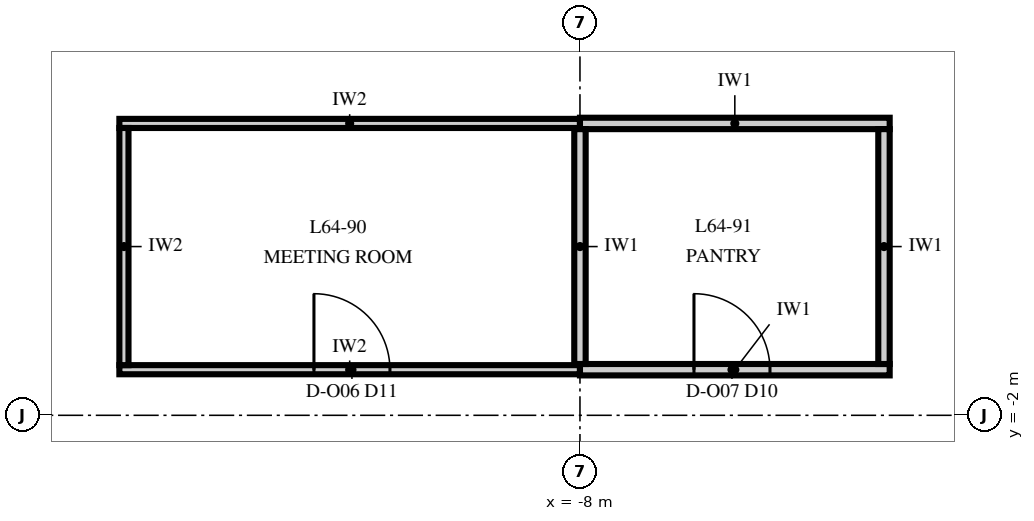
"""IFC4 building model, lengths in metres.
Left out: names, types, materials, properties, quantities, classifications, styles, units other than length and angle.
Written with IfcOpenShell. Run it as: python <this file> out.ifc"""

import sys

from ifc_helpers import new_model, si_unit, direction, frame, frame_2d, origin, place, context, subcontext, project, spatial, rectangle, extrude, element, fill, save


model = new_model("IFC4")
c1 = context("Model", 3, precision=1e-05, world=origin(), true_north=direction((0.0, 1.0)))
c2 = subcontext(c1, "Body", "Model", "MODEL_VIEW")
j1 = project(units=[si_unit("LENGTHUNIT", "METRE"), si_unit("PLANEANGLEUNIT", "RADIAN")], contexts=[c1])
p1 = place(None, origin())
s1 = spatial("IfcSite", under=j1, at=p1, CompositionType="ELEMENT")
p2 = place(p1, origin())
s2 = spatial("IfcBuilding", under=s1, at=p2, CompositionType="ELEMENT")
p3 = place(p2, frame((0.0, 0.0, 276.0)))
s3 = spatial("IfcBuildingStorey", under=s2, at=p3, CompositionType="ELEMENT", Elevation=276.0)
p4 = place(p3, frame((-14.06, -1.4, 0.0), z_axis=(0.0, 0.0, 1.0), x_axis=(1.0, 0.0, 0.0)))
e1 = element("IfcWall", 1, at=p4, inside=s3, PredefinedType="PARTITIONING", context=c2, shape_type="SweptSolid", body=[
    extrude(rectangle(XDim=6.06, YDim=0.12, at=frame_2d((3.03, 0.0))), origin(), (0.0, 0.0, 1.0), 3.23),
])
p5 = place(p4, frame((2.56, 0.0, 0.0)))
e2 = element("IfcOpeningElement", 2, at=p5, cuts=e1, PredefinedType="OPENING", context=c2, shape_type="SweptSolid", body=[
    extrude(rectangle(XDim=1.0, YDim=2.4, at=frame_2d((0.5, 1.2))), frame((0.0, 0.075, 0.0), z_axis=(0.0, -1.0, 0.0), x_axis=(1.0, 0.0, 0.0)), (0.0, 0.0, 1.0), 0.15),
])
p6 = place(p3, frame((-8.0, -1.4, 0.0), z_axis=(0.0, 0.0, 1.0), x_axis=(1.0, 0.0, 0.0)))
e3 = element("IfcWall", 3, at=p6, inside=s3, PredefinedType="PARTITIONING", context=c2, shape_type="SweptSolid", body=[
    extrude(rectangle(XDim=4.075, YDim=0.15, at=frame_2d((2.038, 0.0))), origin(), (0.0, 0.0, 1.0), 3.23),
])
p7 = place(p6, frame((1.5, 0.0, 0.0)))
e4 = element("IfcOpeningElement", 4, at=p7, cuts=e3, PredefinedType="OPENING", context=c2, shape_type="SweptSolid", body=[
    extrude(rectangle(XDim=1.0, YDim=2.3, at=frame_2d((0.5, 1.15))), frame((0.0, 0.09, 0.0), z_axis=(0.0, -1.0, 0.0), x_axis=(1.0, 0.0, 0.0)), (0.0, 0.0, 1.0), 0.18),
])
p8 = place(p3, frame((-14.06, 1.84, 0.0), z_axis=(0.0, 0.0, 1.0), x_axis=(1.0, 0.0, 0.0)))
e5 = element("IfcWall", 5, at=p8, inside=s3, PredefinedType="PARTITIONING", context=c2, shape_type="SweptSolid", body=[
    extrude(rectangle(XDim=6.06, YDim=0.12, at=frame_2d((3.03, 0.0))), origin(), (0.0, 0.0, 1.0), 3.23),
])
p9 = place(p3, frame((-8.0, 1.84, 0.0), z_axis=(0.0, 0.0, 1.0), x_axis=(1.0, 0.0, 0.0)))
e6 = element("IfcWall", 6, at=p9, inside=s3, PredefinedType="PARTITIONING", context=c2, shape_type="SweptSolid", body=[
    extrude(rectangle(XDim=4.075, YDim=0.15, at=frame_2d((2.038, 0.0))), origin(), (0.0, 0.0, 1.0), 3.23),
])
p10 = place(p3, frame((-14.0, -1.34, 0.0), z_axis=(0.0, 0.0, 1.0), x_axis=(0.0, 1.0, 0.0)))
e7 = element("IfcWall", 7, at=p10, inside=s3, PredefinedType="PARTITIONING", context=c2, shape_type="SweptSolid", body=[
    extrude(rectangle(XDim=3.12, YDim=0.12, at=frame_2d((1.56, 0.0))), origin(), (0.0, 0.0, 1.0), 3.23),
])
for number, where, z_axis, x_axis in (
    (8, (-8.0, -1.325, 0.0), (0.0, 0.0, 1.0), (0.0, 1.0, 0.0)),
    (9, (-4.0, -1.325, 0.0), (0.0, 0.0, 1.0), (0.0, 1.0, 0.0)),
):
    element("IfcWall", number, at=place(p3, frame(where, z_axis=z_axis, x_axis=x_axis)), inside=s3, PredefinedType="PARTITIONING", context=c2, shape_type="SweptSolid", body=[
        extrude(rectangle(XDim=3.09, YDim=0.15, at=frame_2d((1.545, 0.0))), origin(), (0.0, 0.0, 1.0), 3.85),
    ])
p11 = place(p5, origin())
e10 = element("IfcDoor", 10, at=p11, inside=s3, OperationType="SINGLE_SWING_RIGHT", PredefinedType="DOOR", context=c2, shape_type="SweptSolid", body=[
    extrude(rectangle(XDim=1.0, YDim=2.4, at=frame_2d((0.5, 1.2))), frame((0.0, 0.06, 0.0), z_axis=(0.0, -1.0, 0.0), x_axis=(1.0, 0.0, 0.0)), (0.0, 0.0, 1.0), 0.12),
])
fill(e2, e10)
p12 = place(p7, origin())
e11 = element("IfcDoor", 11, at=p12, inside=s3, OperationType="SINGLE_SWING_LEFT", PredefinedType="DOOR", context=c2, shape_type="SweptSolid", body=[
    extrude(rectangle(XDim=1.0, YDim=2.3, at=frame_2d((0.5, 1.15))), frame((0.0, 0.075, 0.0), z_axis=(0.0, -1.0, 0.0), x_axis=(1.0, 0.0, 0.0)), (0.0, 0.0, 1.0), 0.149),
])
fill(e4, e11)
save(model, sys.argv[1])
